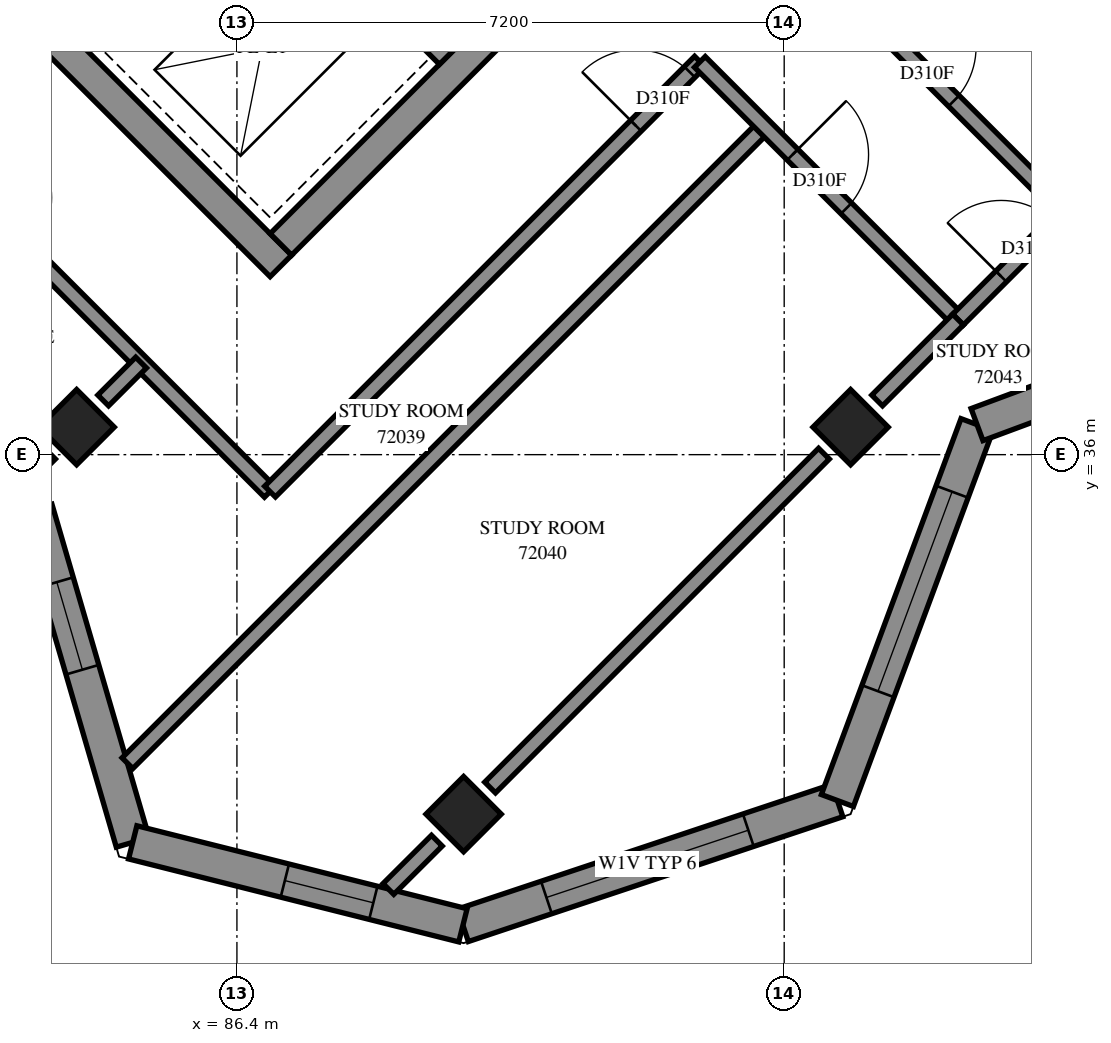
"""IFC4 building model, lengths in metres.
Left out: names, types, materials, properties, quantities, classifications, styles, units other than length and angle.
Written with IfcOpenShell. Run it as: python <this file> out.ifc"""

import sys

from ifc_helpers import new_model, si_unit, direction, frame, frame_2d, origin, origin_2d, place, context, subcontext, project, spatial, polyline, rectangle, outline, extrude, element, fill, save


model = new_model("IFC4")
c1 = context("Model", 3, precision=1e-05, world=origin(), true_north=direction((0.0, 1.0)))
c2 = subcontext(c1, "Body", "Model", "MODEL_VIEW")
j1 = project(units=[si_unit("LENGTHUNIT", "METRE"), si_unit("PLANEANGLEUNIT", "RADIAN")], contexts=[c1])
p1 = place(None, origin())
s1 = spatial("IfcSite", under=j1, at=p1, CompositionType="ELEMENT")
p2 = place(p1, origin())
s2 = spatial("IfcBuilding", under=s1, at=p2, CompositionType="ELEMENT")
p3 = place(p2, frame((0.0, 0.0, 264.2)))
s3 = spatial("IfcBuildingStorey", under=s2, at=p3, CompositionType="ELEMENT", Elevation=264.2)
for number, where, z_axis, x_axis in (
    (1, (84.291, 36.362, 0.0), (0.0, 0.0, 1.0), (0.707, -0.707, 0.0)),
    (2, (94.474, 36.362, 0.0), (0.0, 0.0, 1.0), (0.707, -0.707, 0.0)),
    (3, (89.382, 31.271, 0.0), (0.0, 0.0, 1.0), (0.707, -0.707, 0.0)),
):
    element("IfcColumn", number, at=place(p3, frame(where, z_axis=z_axis, x_axis=x_axis)), inside=s3, PredefinedType="COLUMN", context=c2, shape_type="SweptSolid", body=[
        extrude(rectangle(XDim=0.7, YDim=0.7, at=origin_2d()), origin(), (0.0, 0.0, 1.0), 3.1),
    ])
p4 = place(p3, frame((76.23, 49.231, -0.3), z_axis=(0.0, 0.0, 1.0), x_axis=(0.7071034917, -0.7071100706, 0.0)))
e4 = element("IfcWall", 4, at=p4, inside=s3, PredefinedType="SHEAR", context=c2, shape_type="SweptSolid", body=[
    extrude(rectangle(XDim=15.2, YDim=0.4, at=frame_2d((7.6, 0.0))), origin(), (0.0, 0.0, 1.0), 2.7),
])
p5 = place(p3, frame((86.978, 38.766, -0.3), z_axis=(0.0, 0.0, 1.0), x_axis=(0.7071067812, 0.7071067812, 0.0)))
e5 = element("IfcWall", 5, at=p5, inside=s3, PredefinedType="SHEAR", context=c2, shape_type="SweptSolid", body=[
    extrude(rectangle(XDim=14.4, YDim=0.4, at=frame_2d((7.2, 0.0))), origin(), (0.0, 0.0, 1.0), 2.7),
])
p6 = place(p5, frame((4.55, 0.0, 0.3)))
e6 = element("IfcOpeningElement", 6, at=p6, cuts=e5, PredefinedType="OPENING", context=c2, shape_type="SweptSolid", body=[
    extrude(rectangle(XDim=1.1, YDim=2.1, at=frame_2d((0.55, 1.05))), frame((0.0, 0.21, 0.0), z_axis=(0.0, -1.0, 0.0), x_axis=(1.0, 0.0, 0.0)), (0.0, 0.0, 1.0), 0.42),
])
p7 = place(p5, frame((11.35, 0.0, 0.3)))
e7 = element("IfcOpeningElement", 7, at=p7, cuts=e5, PredefinedType="OPENING", context=c2, shape_type="SweptSolid", body=[
    extrude(rectangle(XDim=1.1, YDim=2.1, at=frame_2d((0.55, 1.05))), frame((0.0, 0.21, 0.0), z_axis=(0.0, -1.0, 0.0), x_axis=(1.0, 0.0, 0.0)), (0.0, 0.0, 1.0), 0.42),
])
p8 = place(p3, frame((78.988, 51.423, 0.0), z_axis=(0.0, 0.0, 1.0), x_axis=(0.7071067812, -0.7071067812, 0.0)))
e8 = element("IfcWall", 8, at=p8, inside=s3, PredefinedType="SOLIDWALL", context=c2, shape_type="SweptSolid", body=[
    extrude(rectangle(XDim=14.4, YDim=0.3, at=frame_2d((7.2, 0.0))), origin(), (0.0, 0.0, 1.0), 3.1),
])
p9 = place(p8, frame((1.35, 0.0, 0.0)))
e9 = element("IfcOpeningElement", 9, at=p9, cuts=e8, PredefinedType="OPENING", context=c2, shape_type="SweptSolid", body=[
    extrude(rectangle(XDim=0.9, YDim=2.1, at=frame_2d((0.45, 1.05))), frame((0.0, 0.16, 0.0), z_axis=(0.0, -1.0, 0.0), x_axis=(1.0, 0.0, 0.0)), (0.0, 0.0, 1.0), 0.32),
])
p10 = place(p8, frame((4.95, 0.0, 0.0)))
e10 = element("IfcOpeningElement", 10, at=p10, cuts=e8, PredefinedType="OPENING", context=c2, shape_type="SweptSolid", body=[
    extrude(rectangle(XDim=0.9, YDim=2.1, at=frame_2d((0.45, 1.05))), frame((0.0, 0.16, 0.0), z_axis=(0.0, -1.0, 0.0), x_axis=(1.0, 0.0, 0.0)), (0.0, 0.0, 1.0), 0.32),
])
p11 = place(p8, frame((8.55, 0.0, 0.0)))
e11 = element("IfcOpeningElement", 11, at=p11, cuts=e8, PredefinedType="OPENING", context=c2, shape_type="SweptSolid", body=[
    extrude(rectangle(XDim=0.9, YDim=2.1, at=frame_2d((0.45, 1.05))), frame((0.0, 0.16, 0.0), z_axis=(0.0, -1.0, 0.0), x_axis=(1.0, 0.0, 0.0)), (0.0, 0.0, 1.0), 0.32),
])
p12 = place(p8, frame((12.05, 0.0, 0.0)))
e12 = element("IfcOpeningElement", 12, at=p12, cuts=e8, PredefinedType="OPENING", context=c2, shape_type="SweptSolid", body=[
    extrude(rectangle(XDim=1.1, YDim=2.1, at=frame_2d((0.55, 1.05))), frame((0.0, 0.16, 0.0), z_axis=(0.0, -1.0, 0.0), x_axis=(1.0, 0.0, 0.0)), (0.0, 0.0, 1.0), 0.32),
])
p13 = place(p3, frame((89.373, 29.808, 0.0), z_axis=(0.0, 0.0, 1.0), x_axis=(0.9486852236, 0.3162219892, 0.0)))
e13 = element("IfcWall", 13, at=p13, inside=s3, PredefinedType="SOLIDWALL", context=c2, shape_type="SweptSolid", body=[
    extrude(outline(polyline([(-0.066, -0.225), (5.301, -0.225), (5.085, 0.225), (0.066, 0.225), (-0.066, -0.225)])), origin(), (0.0, 0.0, 1.0), 3.1),
])
p14 = place(p13, frame((1.158, 0.0, 0.45)))
e14 = element("IfcOpeningElement", 14, at=p14, cuts=e13, PredefinedType="OPENING", context=c2, shape_type="SweptSolid", body=[
    extrude(rectangle(XDim=2.8, YDim=2.55, at=frame_2d((1.4, 1.275))), frame((0.0, 0.235, 0.0), z_axis=(0.0, -1.0, 0.0), x_axis=(1.0, 0.0, 0.0)), (0.0, 0.0, 1.0), 0.47),
])
p15 = place(p3, frame((94.3, 31.45, 0.0), z_axis=(0.0, 0.0, 1.0), x_axis=(0.3481927166, 0.9374229739, 0.0)))
e15 = element("IfcWall", 15, at=p15, inside=s3, PredefinedType="SOLIDWALL", context=c2, shape_type="SweptSolid", body=[
    extrude(outline(polyline([(-0.108, -0.225), (5.172, -0.225), (5.379, 0.225), (0.108, 0.225), (-0.108, -0.225)])), origin(), (0.0, 0.0, 1.0), 3.1),
])
p16 = place(p15, frame((1.534, 0.0, 0.45)))
e16 = element("IfcOpeningElement", 16, at=p16, cuts=e15, PredefinedType="OPENING", context=c2, shape_type="SweptSolid", body=[
    extrude(rectangle(XDim=2.8, YDim=2.55, at=frame_2d((1.4, 1.275))), frame((0.0, 0.235, 0.0), z_axis=(0.0, -1.0, 0.0), x_axis=(1.0, 0.0, 0.0)), (0.0, 0.0, 1.0), 0.47),
])
p17 = place(p3, frame((96.137, 36.395, 0.0), z_axis=(0.0, 0.0, 1.0), x_axis=(0.937429161, 0.3481760591, 0.0)))
e17 = element("IfcWall", 17, at=p17, inside=s3, PredefinedType="SOLIDWALL", context=c2, shape_type="SweptSolid", body=[
    extrude(outline(polyline([(0.103, -0.225), (5.383, -0.225), (5.168, 0.225), (-0.103, 0.225), (0.103, -0.225)])), origin(), (0.0, 0.0, 1.0), 3.1),
])
p18 = place(p17, frame((1.651, 0.0, 0.45)))
e18 = element("IfcOpeningElement", 18, at=p18, cuts=e17, PredefinedType="OPENING", context=c2, shape_type="SweptSolid", body=[
    extrude(rectangle(XDim=2.8, YDim=2.55, at=frame_2d((1.4, 1.275))), frame((0.0, 0.235, 0.0), z_axis=(0.0, -1.0, 0.0), x_axis=(1.0, 0.0, 0.0)), (0.0, 0.0, 1.0), 0.47),
])
p19 = place(p3, frame((83.75, 35.286, 0.0), z_axis=(0.0, 0.0, 1.0), x_axis=(0.2799260409, -0.9600215683, 0.0)))
e19 = element("IfcWall", 19, at=p19, inside=s3, PredefinedType="SOLIDWALL", context=c2, shape_type="SweptSolid", body=[
    extrude(outline(polyline([(0.123, -0.225), (4.698, -0.225), (4.44, 0.225), (-0.123, 0.225), (0.123, -0.225)])), origin(), (0.0, 0.0, 1.0), 3.1),
])
p20 = place(p19, frame((1.003, 0.0, 0.45)))
e20 = element("IfcOpeningElement", 20, at=p20, cuts=e19, PredefinedType="OPENING", context=c2, shape_type="SweptSolid", body=[
    extrude(rectangle(XDim=1.2, YDim=2.55, at=frame_2d((0.6, 1.275))), frame((0.0, 0.235, 0.0), z_axis=(0.0, -1.0, 0.0), x_axis=(1.0, 0.0, 0.0)), (0.0, 0.0, 1.0), 0.47),
])
p21 = place(p3, frame((85.029, 30.899, 0.0), z_axis=(0.0, 0.0, 1.0), x_axis=(0.9698515846, -0.2436963354, 0.0)))
e21 = element("IfcWall", 21, at=p21, inside=s3, PredefinedType="SOLIDWALL", context=c2, shape_type="SweptSolid", body=[
    extrude(outline(polyline([(-0.129, -0.225), (4.545, -0.225), (4.414, 0.225), (0.129, 0.225), (-0.129, -0.225)])), origin(), (0.0, 0.0, 1.0), 3.1),
])
p22 = place(p21, frame((2.064, 0.0, 0.45)))
e22 = element("IfcOpeningElement", 22, at=p22, cuts=e21, PredefinedType="OPENING", context=c2, shape_type="SweptSolid", body=[
    extrude(rectangle(XDim=1.2, YDim=2.55, at=frame_2d((0.6, 1.275))), frame((0.0, 0.235, 0.0), z_axis=(0.0, -1.0, 0.0), x_axis=(1.0, 0.0, 0.0)), (0.0, 0.0, 1.0), 0.47),
])
p23 = place(p3, frame((84.96, 31.941, 0.0), z_axis=(0.0, 0.0, 1.0), x_axis=(0.707102563, 0.7071109994, 0.0)))
e23 = element("IfcWall", 23, at=p23, inside=s3, PredefinedType="PARTITIONING", context=c2, shape_type="SweptSolid", body=[
    extrude(rectangle(XDim=11.853, YDim=0.2, at=frame_2d((5.927, 0.0))), origin(), (0.0, 0.0, 1.0), 3.1),
])
p24 = place(p3, frame((80.747, 41.597, 0.0), z_axis=(0.0, 0.0, 1.0), x_axis=(0.7071067812, -0.7071067812, 0.0)))
e24 = element("IfcWall", 24, at=p24, inside=s3, PredefinedType="PARTITIONING", context=c2, shape_type="SweptSolid", body=[
    extrude(rectangle(XDim=8.607, YDim=0.2, at=frame_2d((4.303, 0.0))), origin(), (0.0, 0.0, 1.0), 3.1),
])
p25 = place(p24, frame((0.195, 0.0, 0.0)))
e25 = element("IfcOpeningElement", 25, at=p25, cuts=e24, PredefinedType="OPENING", context=c2, shape_type="SweptSolid", body=[
    extrude(rectangle(XDim=1.0, YDim=2.1, at=frame_2d((0.5, 1.05))), frame((0.0, 0.11, 0.0), z_axis=(0.0, -1.0, 0.0), x_axis=(1.0, 0.0, 0.0)), (0.0, 0.0, 1.0), 0.22),
])
p26 = place(p24, frame((3.133, 0.0, 0.0)))
e26 = element("IfcOpeningElement", 26, at=p26, cuts=e24, PredefinedType="OPENING", context=c2, shape_type="SweptSolid", body=[
    extrude(rectangle(XDim=1.0, YDim=2.1, at=frame_2d((0.5, 1.05))), frame((0.0, 0.11, 0.0), z_axis=(0.0, -1.0, 0.0), x_axis=(1.0, 0.0, 0.0)), (0.0, 0.0, 1.0), 0.22),
])
p27 = place(p3, frame((86.836, 35.514, 0.0), z_axis=(0.0, 0.0, 1.0), x_axis=(0.7071067812, 0.7071067812, 0.0)))
e27 = element("IfcWall", 27, at=p27, inside=s3, PredefinedType="PARTITIONING", context=c2, shape_type="SweptSolid", body=[
    extrude(rectangle(XDim=7.999, YDim=0.2, at=frame_2d((3.999, 0.0))), origin(), (0.0, 0.0, 1.0), 3.1),
])
p28 = place(p27, frame((6.807, 0.0, 0.0)))
e28 = element("IfcOpeningElement", 28, at=p28, cuts=e27, PredefinedType="OPENING", context=c2, shape_type="SweptSolid", body=[
    extrude(rectangle(XDim=1.0, YDim=2.1, at=frame_2d((0.5, 1.05))), frame((0.0, 0.11, 0.0), z_axis=(0.0, -1.0, 0.0), x_axis=(1.0, 0.0, 0.0)), (0.0, 0.0, 1.0), 0.22),
])
p29 = place(p3, frame((89.731, 31.621, 0.0), z_axis=(0.0, 0.0, 1.0), x_axis=(0.7071067812, 0.7071067812, 0.0)))
e29 = element("IfcWall", 29, at=p29, inside=s3, PredefinedType="PARTITIONING", context=c2, shape_type="SweptSolid", body=[
    extrude(rectangle(XDim=6.211, YDim=0.2, at=frame_2d((3.106, 0.0))), origin(), (0.0, 0.0, 1.0), 2.6),
])
p30 = place(p3, frame((93.905, 42.581, 0.0), z_axis=(0.0, 0.0, 1.0), x_axis=(0.7071067812, -0.7071067812, 0.0)))
e30 = element("IfcWall", 30, at=p30, inside=s3, PredefinedType="PARTITIONING", context=c2, shape_type="SweptSolid", body=[
    extrude(rectangle(XDim=4.8, YDim=0.2, at=frame_2d((2.4, 0.0))), origin(), (0.0, 0.0, 1.0), 3.1),
])
p31 = place(p30, frame((1.725, 0.0, 0.0)))
e31 = element("IfcOpeningElement", 31, at=p31, cuts=e30, PredefinedType="OPENING", context=c2, shape_type="SweptSolid", body=[
    extrude(rectangle(XDim=1.0, YDim=2.1, at=frame_2d((0.5, 1.05))), frame((0.0, 0.11, 0.0), z_axis=(0.0, -1.0, 0.0), x_axis=(1.0, 0.0, 0.0)), (0.0, 0.0, 1.0), 0.22),
])
p32 = place(p3, frame((92.491, 41.167, 0.0), z_axis=(0.0, 0.0, 1.0), x_axis=(0.7071067812, -0.7071067812, 0.0)))
e32 = element("IfcWall", 32, at=p32, inside=s3, PredefinedType="PARTITIONING", context=c2, shape_type="SweptSolid", body=[
    extrude(rectangle(XDim=4.8, YDim=0.2, at=frame_2d((2.4, 0.0))), origin(), (0.0, 0.0, 1.0), 3.1),
])
p33 = place(p32, frame((1.725, 0.0, 0.0)))
e33 = element("IfcOpeningElement", 33, at=p33, cuts=e32, PredefinedType="OPENING", context=c2, shape_type="SweptSolid", body=[
    extrude(rectangle(XDim=1.0, YDim=2.1, at=frame_2d((0.5, 1.05))), frame((0.0, 0.11, 0.0), z_axis=(0.0, -1.0, 0.0), x_axis=(1.0, 0.0, 0.0)), (0.0, 0.0, 1.0), 0.22),
])
p34 = place(p3, frame((95.887, 37.777, 0.0), z_axis=(0.0, 0.0, 1.0), x_axis=(0.7071067812, 0.7071067812, 0.0)))
e34 = element("IfcWall", 34, at=p34, inside=s3, PredefinedType="PARTITIONING", context=c2, shape_type="SweptSolid", body=[
    extrude(rectangle(XDim=2.0, YDim=0.2, at=frame_2d((1.0, 0.0))), origin(), (0.0, 0.0, 1.0), 2.6),
])
p35 = place(p34, frame((0.803, 0.0, 0.0)))
e35 = element("IfcOpeningElement", 35, at=p35, cuts=e34, PredefinedType="OPENING", context=c2, shape_type="SweptSolid", body=[
    extrude(rectangle(XDim=1.0, YDim=2.1, at=frame_2d((0.5, 1.05))), frame((0.0, 0.11, 0.0), z_axis=(0.0, -1.0, 0.0), x_axis=(1.0, 0.0, 0.0)), (0.0, 0.0, 1.0), 0.22),
])
p36 = place(p3, frame((94.823, 36.713, 0.0), z_axis=(0.0, 0.0, 1.0), x_axis=(0.7071067812, 0.7071067812, 0.0)))
e36 = element("IfcWall", 36, at=p36, inside=s3, PredefinedType="PARTITIONING", context=c2, shape_type="SweptSolid", body=[
    extrude(rectangle(XDim=1.505, YDim=0.2, at=frame_2d((0.752, 0.0))), origin(), (0.0, 0.0, 1.0), 2.6),
])
p37 = place(p3, frame((88.393, 30.286, 0.0), z_axis=(0.0, 0.0, 1.0), x_axis=(0.7083277461, 0.7058837043, 0.0)))
e37 = element("IfcWall", 37, at=p37, inside=s3, PredefinedType="PARTITIONING", context=c2, shape_type="SweptSolid", body=[
    extrude(rectangle(XDim=0.9, YDim=0.2, at=frame_2d((0.45, 0.0))), origin(), (0.0, 0.0, 1.0), 3.1),
])
p38 = place(p3, frame((84.641, 36.713, 0.0), z_axis=(0.0, 0.0, 1.0), x_axis=(0.7071067812, 0.7071067812, 0.0)))
e38 = element("IfcWall", 38, at=p38, inside=s3, PredefinedType="PARTITIONING", context=c2, shape_type="SweptSolid", body=[
    extrude(rectangle(XDim=0.704, YDim=0.2, at=frame_2d((0.352, 0.0))), origin(), (0.0, 0.0, 1.0), 3.1),
])
p39 = place(p3, frame((83.516, 35.588, 0.0), z_axis=(0.0, 0.0, 1.0), x_axis=(0.7070235383, 0.7071900143, 0.0)))
e39 = element("IfcWall", 39, at=p39, inside=s3, PredefinedType="PARTITIONING", context=c2, shape_type="SweptSolid", body=[
    extrude(rectangle(XDim=0.601, YDim=0.2, at=frame_2d((0.3, 0.0))), origin(), (0.0, 0.0, 1.0), 3.1),
])
p40 = place(p14, origin())
e40 = element("IfcWindow", 40, at=p40, inside=s3, PartitioningType="SINGLE_PANEL", PredefinedType="WINDOW", context=c2, shape_type="SweptSolid", body=[
    extrude(rectangle(XDim=2.8, YDim=2.55, at=frame_2d((1.4, 1.275))), frame((0.0, 0.205, 0.0), z_axis=(0.0, -1.0, 0.0), x_axis=(1.0, 0.0, 0.0)), (0.0, 0.0, 1.0), 0.06),
])
fill(e14, e40)
p41 = place(p16, origin())
e41 = element("IfcWindow", 41, at=p41, inside=s3, PartitioningType="SINGLE_PANEL", PredefinedType="WINDOW", context=c2, shape_type="SweptSolid", body=[
    extrude(rectangle(XDim=2.8, YDim=2.55, at=frame_2d((1.4, 1.275))), frame((0.0, 0.205, 0.0), z_axis=(0.0, -1.0, 0.0), x_axis=(1.0, 0.0, 0.0)), (0.0, 0.0, 1.0), 0.06),
])
fill(e16, e41)
p42 = place(p20, origin())
e42 = element("IfcWindow", 42, at=p42, inside=s3, PartitioningType="SINGLE_PANEL", PredefinedType="WINDOW", context=c2, shape_type="SweptSolid", body=[
    extrude(rectangle(XDim=1.2, YDim=2.55, at=frame_2d((0.6, 1.275))), frame((0.0, 0.205, 0.0), z_axis=(0.0, -1.0, 0.0), x_axis=(1.0, 0.0, 0.0)), (0.0, 0.0, 1.0), 0.06),
])
fill(e20, e42)
p43 = place(p22, origin())
e43 = element("IfcWindow", 43, at=p43, inside=s3, PartitioningType="SINGLE_PANEL", PredefinedType="WINDOW", context=c2, shape_type="SweptSolid", body=[
    extrude(rectangle(XDim=1.2, YDim=2.55, at=frame_2d((0.6, 1.275))), frame((0.0, 0.205, 0.0), z_axis=(0.0, -1.0, 0.0), x_axis=(1.0, 0.0, 0.0)), (0.0, 0.0, 1.0), 0.06),
])
fill(e22, e43)
p44 = place(p28, origin())
e44 = element("IfcDoor", 44, at=p44, inside=s3, OperationType="SINGLE_SWING_RIGHT", PredefinedType="DOOR", context=c2, shape_type="SweptSolid", body=[
    extrude(rectangle(XDim=1.0, YDim=2.1, at=frame_2d((0.5, 1.05))), frame((0.0, 0.025, 0.0), z_axis=(0.0, -1.0, 0.0), x_axis=(1.0, 0.0, 0.0)), (0.0, 0.0, 1.0), 0.05),
])
fill(e28, e44)
p45 = place(p33, origin())
e45 = element("IfcDoor", 45, at=p45, inside=s3, OperationType="SINGLE_SWING_LEFT", PredefinedType="DOOR", context=c2, shape_type="SweptSolid", body=[
    extrude(rectangle(XDim=1.0, YDim=2.1, at=frame_2d((0.5, 1.05))), frame((0.0, 0.025, 0.0), z_axis=(0.0, -1.0, 0.0), x_axis=(1.0, 0.0, 0.0)), (0.0, 0.0, 1.0), 0.05),
])
fill(e33, e45)
p46 = place(p31, origin())
e46 = element("IfcDoor", 46, at=p46, inside=s3, OperationType="SINGLE_SWING_RIGHT", PredefinedType="DOOR", context=c2, shape_type="SweptSolid", body=[
    extrude(rectangle(XDim=1.0, YDim=2.1, at=frame_2d((0.5, 1.05))), frame((0.0, 0.025, 0.0), z_axis=(0.0, -1.0, 0.0), x_axis=(1.0, 0.0, 0.0)), (0.0, 0.0, 1.0), 0.05),
])
fill(e31, e46)
p47 = place(p35, origin())
e47 = element("IfcDoor", 47, at=p47, inside=s3, OperationType="SINGLE_SWING_RIGHT", PredefinedType="DOOR", context=c2, shape_type="SweptSolid", body=[
    extrude(rectangle(XDim=1.0, YDim=2.1, at=frame_2d((0.5, 1.05))), frame((0.0, 0.025, 0.0), z_axis=(0.0, -1.0, 0.0), x_axis=(1.0, 0.0, 0.0)), (0.0, 0.0, 1.0), 0.05),
])
fill(e35, e47)
save(model, sys.argv[1])
